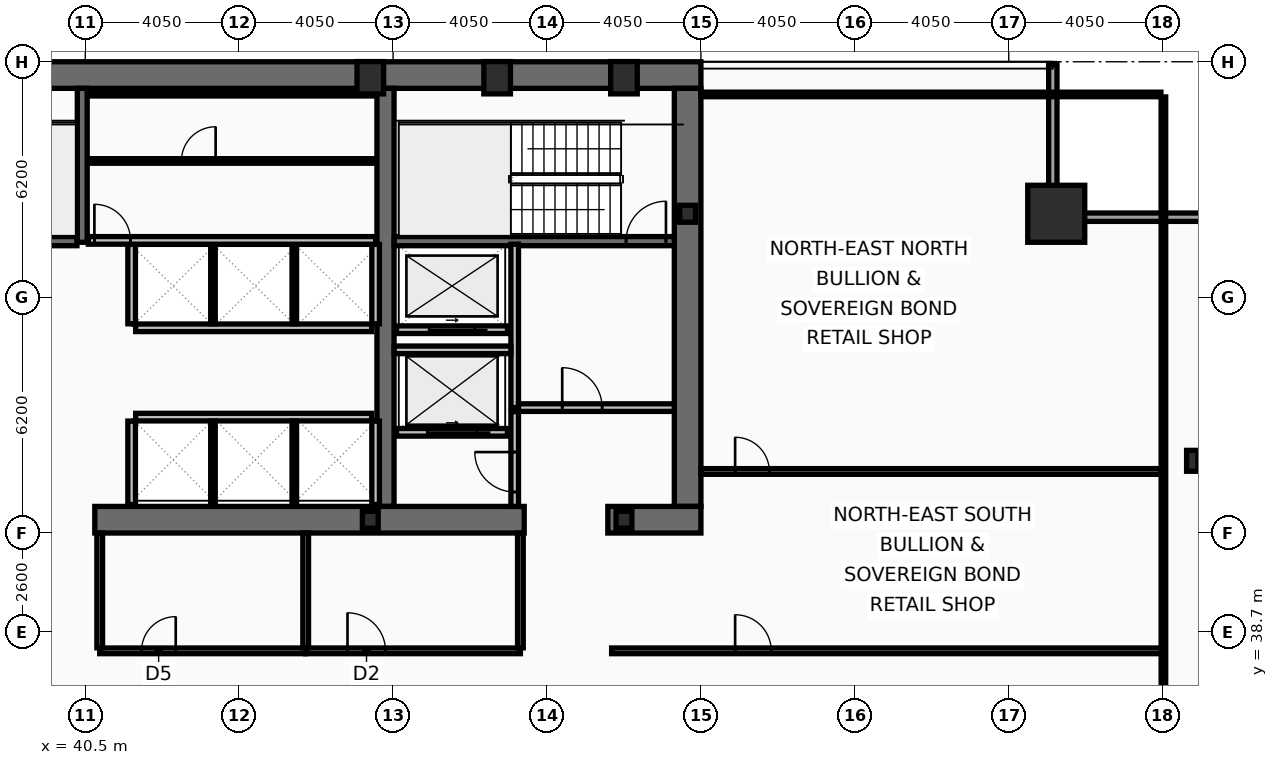
"""IFC4 building model, lengths in metres.
Left out: names, types, materials, properties, quantities, classifications, styles, units other than length and angle.
Written with IfcOpenShell. Run it as: python <this file> out.ifc"""

import sys

from ifc_helpers import new_model, si_unit, direction, frame, frame_2d, origin, origin_2d, place, context, subcontext, project, spatial, rectangle, hollow_rectangle, i_section, extrude, element, fill, save


model = new_model("IFC4")
c1 = context("Model", 3, precision=1e-05, world=origin(), true_north=direction((0.0, 1.0)))
c2 = subcontext(c1, "Body", "Model", "MODEL_VIEW")
j1 = project(units=[si_unit("LENGTHUNIT", "METRE"), si_unit("PLANEANGLEUNIT", "RADIAN")], contexts=[c1])
p1 = place(None, origin())
s1 = spatial("IfcSite", under=j1, at=p1, CompositionType="ELEMENT")
p2 = place(p1, origin())
s2 = spatial("IfcBuilding", under=s1, at=p2, CompositionType="ELEMENT")
p3 = place(p2, frame((0.0, 0.0, 129.0)))
s3 = spatial("IfcBuildingStorey", under=s2, at=p3, CompositionType="ELEMENT", Elevation=129.0)
p4 = place(p3, frame((16.2, 53.35, 0.0), z_axis=(0.0, 0.0, 1.0), x_axis=(1.0, 0.0, 0.0)))
e1 = element("IfcWall", 1, at=p4, inside=s3, PredefinedType="SHEAR", context=c2, shape_type="SweptSolid", body=[
    extrude(rectangle(XDim=40.5, YDim=0.7, at=frame_2d((20.25, 0.0))), origin(), (0.0, 0.0, 1.0), 3.44),
])
p5 = place(p3, frame((56.35, 53.0, 0.0), z_axis=(0.0, 0.0, 1.0), x_axis=(0.0, -1.0, 0.0)))
e2 = element("IfcWall", 2, at=p5, inside=s3, PredefinedType="SHEAR", context=c2, shape_type="SweptSolid", body=[
    extrude(rectangle(XDim=11.0, YDim=0.7, at=frame_2d((5.5, 0.0))), origin(), (0.0, 0.0, 1.0), 3.44),
])
p6 = place(p3, frame((48.4, 42.0, 0.0), z_axis=(0.0, 0.0, 1.0), x_axis=(0.0, 1.0, 0.0)))
e3 = element("IfcWall", 3, at=p6, inside=s3, PredefinedType="SHEAR", context=c2, shape_type="SweptSolid", body=[
    extrude(rectangle(XDim=11.0, YDim=0.45, at=frame_2d((5.5, 0.0))), origin(), (0.0, 0.0, 1.0), 3.44),
])
p7 = place(p3, frame((52.05, 41.65, 0.0), z_axis=(0.0, 0.0, 1.0), x_axis=(-1.0, 0.0, 0.0)))
e4 = element("IfcWall", 4, at=p7, inside=s3, PredefinedType="SHEAR", context=c2, shape_type="SweptSolid", body=[
    extrude(rectangle(XDim=11.3, YDim=0.7, at=frame_2d((5.65, 0.0))), origin(), (0.0, 0.0, 1.0), 3.44),
])
p8 = place(p3, frame((56.7, 41.65, 0.0), z_axis=(0.0, 0.0, 1.0), x_axis=(-1.0, 0.0, 0.0)))
e5 = element("IfcWall", 5, at=p8, inside=s3, PredefinedType="SHEAR", context=c2, shape_type="SweptSolid", body=[
    extrude(rectangle(XDim=2.45, YDim=0.7, at=frame_2d((1.225, 0.0))), origin(), (0.0, 0.0, 1.0), 3.44),
])
p9 = place(p3, frame((40.42, 48.95, 0.0), z_axis=(0.0, 0.0, 1.0), x_axis=(0.0, 1.0, 0.0)))
e6 = element("IfcWall", 6, at=p9, inside=s3, PredefinedType="SHEAR", context=c2, shape_type="SweptSolid", body=[
    extrude(rectangle(XDim=4.05, YDim=0.26, at=frame_2d((2.025, 0.0))), origin(), (0.0, 0.0, 1.0), 3.44),
])
p10 = place(p3, frame((48.63, 48.98, 0.0), z_axis=(0.0, 0.0, 1.0), x_axis=(1.0, 0.0, 0.0)))
e7 = element("IfcWall", 7, at=p10, inside=s3, PredefinedType="SHEAR", context=c2, shape_type="SweptSolid", body=[
    extrude(rectangle(XDim=7.37, YDim=0.24, at=frame_2d((3.685, 0.0))), origin(), (0.0, 0.0, 1.0), 3.44),
])
p11 = place(p10, frame((6.1, 0.0, 0.0)))
e8 = element("IfcOpeningElement", 8, at=p11, cuts=e7, PredefinedType="OPENING", context=c2, shape_type="SweptSolid", body=[
    extrude(rectangle(XDim=1.05, YDim=2.15, at=frame_2d((0.525, 1.075))), frame((0.0, 0.13, 0.0), z_axis=(0.0, -1.0, 0.0), x_axis=(1.0, 0.0, 0.0)), (0.0, 0.0, 1.0), 0.26),
])
p12 = place(p3, frame((32.72, 48.98, 0.0), z_axis=(0.0, 0.0, 1.0), x_axis=(1.0, 0.0, 0.0)))
e9 = element("IfcWall", 9, at=p12, inside=s3, PredefinedType="SHEAR", context=c2, shape_type="SweptSolid", body=[
    extrude(rectangle(XDim=7.56, YDim=0.24, at=frame_2d((3.78, 0.0))), origin(), (0.0, 0.0, 1.0), 3.44),
])
p13 = place(p12, frame((0.22, 0.0, 0.0)))
e10 = element("IfcOpeningElement", 10, at=p13, cuts=e9, PredefinedType="OPENING", context=c2, shape_type="SweptSolid", body=[
    extrude(rectangle(XDim=1.05, YDim=2.15, at=frame_2d((0.525, 1.075))), frame((0.0, 0.13, 0.0), z_axis=(0.0, -1.0, 0.0), x_axis=(1.0, 0.0, 0.0)), (0.0, 0.0, 1.0), 0.26),
])
p14 = place(p3, frame((66.05, 49.7, 0.0), z_axis=(0.0, 0.0, 1.0), x_axis=(1.0, 0.0, 0.0)))
e11 = element("IfcColumn", 11, at=p14, inside=s3, PredefinedType="COLUMN", context=c2, shape_type="SweptSolid", body=[
    extrude(hollow_rectangle(XDim=1.5, YDim=1.5, WallThickness=0.07, at=origin_2d()), origin(), (0.0, 0.0, 1.0), 3.6),
])
for number, where, z_axis, x_axis in (
    (12, (48.0, 53.28, 0.0), (0.0, 0.0, 1.0), (1.0, 0.0, 0.0)),
    (13, (51.337, 53.28, 0.0), (0.0, 0.0, 1.0), (1.0, 0.0, 0.0)),
    (14, (54.675, 53.28, 0.0), (0.0, 0.0, 1.0), (1.0, 0.0, 0.0)),
):
    element("IfcColumn", number, at=place(p3, frame(where, z_axis=z_axis, x_axis=x_axis)), inside=s3, PredefinedType="COLUMN", context=c2, shape_type="SweptSolid", body=[
        extrude(hollow_rectangle(XDim=0.7, YDim=0.85, WallThickness=0.05, at=origin_2d()), origin(), (0.0, 0.0, 1.0), 3.6),
    ])
p15 = place(p3, frame((69.63, 43.2, 0.0), z_axis=(0.0, 0.0, 1.0), x_axis=(1.0, 0.0, 0.0)))
e15 = element("IfcColumn", 15, at=p15, inside=s3, PredefinedType="COLUMN", context=c2, shape_type="SweptSolid", body=[
    extrude(i_section(OverallWidth=0.3, OverallDepth=0.55, WebThickness=0.015, FlangeThickness=0.029, at=origin_2d()), origin(), (0.0, 0.0, 1.0), 3.6),
])
for number, where, z_axis, x_axis in (
    (16, (56.35, 49.7, 0.0), (0.0, 0.0, 1.0), (1.0, 0.0, 0.0)),
    (17, (48.0, 41.65, 0.0), (0.0, 0.0, 1.0), (1.0, 0.0, 0.0)),
    (18, (54.675, 41.65, 0.0), (0.0, 0.0, 1.0), (1.0, 0.0, 0.0)),
):
    element("IfcColumn", number, at=place(p3, frame(where, z_axis=z_axis, x_axis=x_axis)), inside=s3, PredefinedType="COLUMN", context=c2, shape_type="SweptSolid", body=[
        extrude(i_section(OverallWidth=0.416, OverallDepth=0.446, WebThickness=0.039, FlangeThickness=0.063, at=origin_2d()), origin(), (0.0, 0.0, 1.0), 3.6),
    ])
p16 = place(p3, frame((65.96, 53.63, 0.0), z_axis=(0.0, 0.0, 1.0), x_axis=(0.0, -1.0, 0.0)))
e19 = element("IfcWall", 19, at=p16, inside=s3, PredefinedType="SOLIDWALL", context=c2, shape_type="SweptSolid", body=[
    extrude(rectangle(XDim=3.91, YDim=0.22, at=frame_2d((1.955, 0.0))), origin(), (0.0, 0.0, 1.0), 2.83),
])
p17 = place(p3, frame((65.85, 49.61, 0.0), z_axis=(0.0, 0.0, 1.0), x_axis=(1.0, 0.0, 0.0)))
e20 = element("IfcWall", 20, at=p17, inside=s3, PredefinedType="SOLIDWALL", context=c2, shape_type="SweptSolid", body=[
    extrude(rectangle(XDim=4.22, YDim=0.22, at=frame_2d((2.11, 0.0))), origin(), (0.0, 0.0, 1.0), 2.83),
])
p18 = place(p3, frame((51.61, 43.95, 0.0), z_axis=(0.0, 0.0, 1.0), x_axis=(-1.0, 0.0, 0.0)))
e21 = element("IfcWall", 21, at=p18, inside=s3, PredefinedType="PARTITIONING", context=c2, shape_type="SweptSolid", body=[
    extrude(rectangle(XDim=2.92, YDim=0.2, at=frame_2d((1.46, 0.0))), origin(), (0.0, 0.0, 1.0), 3.44),
])
p19 = place(p18, frame((0.81, 0.0, 0.0)))
e22 = element("IfcOpeningElement", 22, at=p19, cuts=e21, PredefinedType="OPENING", context=c2, shape_type="SweptSolid", body=[
    extrude(rectangle(XDim=1.3, YDim=2.18, at=frame_2d((0.65, 1.09))), frame((0.0, 0.11, 0.0), z_axis=(0.0, -1.0, 0.0), x_axis=(1.0, 0.0, 0.0)), (0.0, 0.0, 1.0), 0.22),
])
p20 = place(p3, frame((51.61, 46.65, 0.0), z_axis=(0.0, 0.0, 1.0), x_axis=(-1.0, 0.0, 0.0)))
e23 = element("IfcWall", 23, at=p20, inside=s3, PredefinedType="PARTITIONING", context=c2, shape_type="SweptSolid", body=[
    extrude(rectangle(XDim=2.92, YDim=0.2, at=frame_2d((1.46, 0.0))), origin(), (0.0, 0.0, 1.0), 3.44),
])
p21 = place(p20, frame((0.86, 0.0, 0.0)))
e24 = element("IfcOpeningElement", 24, at=p21, cuts=e23, PredefinedType="OPENING", context=c2, shape_type="SweptSolid", body=[
    extrude(rectangle(XDim=1.2, YDim=2.18, at=frame_2d((0.6, 1.09))), frame((0.0, 0.11, 0.0), z_axis=(0.0, -1.0, 0.0), x_axis=(1.0, 0.0, 0.0)), (0.0, 0.0, 1.0), 0.22),
])
p22 = place(p3, frame((51.8, 44.6, 0.0), z_axis=(0.0, 0.0, 1.0), x_axis=(0.0, 1.0, 0.0)))
e25 = element("IfcWall", 25, at=p22, inside=s3, PredefinedType="PARTITIONING", context=c2, shape_type="SweptSolid", body=[
    extrude(rectangle(XDim=4.3, YDim=0.2, at=frame_2d((2.15, 0.0))), origin(), (0.0, 0.0, 1.0), 3.44),
])
p23 = place(p3, frame((51.9, 44.6, 0.0), z_axis=(0.0, 0.0, 1.0), x_axis=(1.0, 0.0, 0.0)))
e26 = element("IfcWall", 26, at=p23, inside=s3, PredefinedType="PARTITIONING", context=c2, shape_type="SweptSolid", body=[
    extrude(rectangle(XDim=4.1, YDim=0.2, at=frame_2d((2.05, 0.0))), origin(), (0.0, 0.0, 1.0), 3.44),
])
p24 = place(p23, frame((1.15, 0.0, 0.0)))
e27 = element("IfcOpeningElement", 27, at=p24, cuts=e26, PredefinedType="OPENING", context=c2, shape_type="SweptSolid", body=[
    extrude(rectangle(XDim=1.05, YDim=2.15, at=frame_2d((0.525, 1.075))), frame((0.0, 0.11, 0.0), z_axis=(0.0, -1.0, 0.0), x_axis=(1.0, 0.0, 0.0)), (0.0, 0.0, 1.0), 0.22),
])
p25 = place(p3, frame((48.63, 46.12, 0.0), z_axis=(0.0, 0.0, 1.0), x_axis=(1.0, 0.0, 0.0)))
e28 = element("IfcWall", 28, at=p25, inside=s3, PredefinedType="PARTITIONING", context=c2, shape_type="SweptSolid", body=[
    extrude(rectangle(XDim=3.07, YDim=0.2, at=frame_2d((1.535, 0.0))), origin(), (0.0, 0.0, 1.0), 3.44),
])
p26 = place(p3, frame((51.8, 42.0, 0.0), z_axis=(0.0, 0.0, 1.0), x_axis=(0.0, 1.0, 0.0)))
e29 = element("IfcWall", 29, at=p26, inside=s3, PredefinedType="PARTITIONING", context=c2, shape_type="SweptSolid", body=[
    extrude(rectangle(XDim=2.495, YDim=0.2, at=frame_2d((1.248, 0.0))), origin(), (0.0, 0.0, 1.0), 3.44),
])
p27 = place(p26, frame((0.38, 0.0, 0.0)))
e30 = element("IfcOpeningElement", 30, at=p27, cuts=e29, PredefinedType="OPENING", context=c2, shape_type="SweptSolid", body=[
    extrude(rectangle(XDim=1.05, YDim=2.15, at=frame_2d((0.525, 1.075))), frame((0.0, 0.11, 0.0), z_axis=(0.0, -1.0, 0.0), x_axis=(1.0, 0.0, 0.0)), (0.0, 0.0, 1.0), 0.22),
])
p28 = place(p3, frame((41.825, 46.7, 0.0), z_axis=(0.0, 0.0, 1.0), x_axis=(1.0, 0.0, 0.0)))
e31 = element("IfcWall", 31, at=p28, inside=s3, PredefinedType="PARTITIONING", context=c2, shape_type="SweptSolid", body=[
    extrude(rectangle(XDim=6.21, YDim=0.2, at=frame_2d((3.105, 0.0))), origin(), (0.0, 0.0, 1.0), 3.44),
])
for number, where, z_axis, x_axis in (
    (32, (41.72, 46.805, 0.0), (0.0, 0.0, 1.0), (0.0, 1.0, 0.0)),
    (33, (48.14, 46.805, 0.0), (0.0, 0.0, 1.0), (0.0, 1.0, 0.0)),
):
    element("IfcWall", number, at=place(p3, frame(where, z_axis=z_axis, x_axis=x_axis)), inside=s3, PredefinedType="PARTITIONING", context=c2, shape_type="SweptSolid", body=[
        extrude(rectangle(XDim=2.09, YDim=0.2, at=frame_2d((1.045, 0.0))), origin(), (0.0, 0.0, 1.0), 3.44),
    ])
for number, where, z_axis, x_axis in (
    (34, (43.86, 46.805, 0.0), (0.0, 0.0, 1.0), (0.0, 1.0, 0.0)),
    (35, (46.0, 46.805, 0.0), (0.0, 0.0, 1.0), (0.0, 1.0, 0.0)),
):
    element("IfcWall", number, at=place(p3, frame(where, z_axis=z_axis, x_axis=x_axis)), inside=s3, PredefinedType="PARTITIONING", context=c2, shape_type="SweptSolid", body=[
        extrude(rectangle(XDim=2.09, YDim=0.12, at=frame_2d((1.045, 0.0))), origin(), (0.0, 0.0, 1.0), 3.44),
    ])
p29 = place(p3, frame((41.825, 44.35, 0.0), z_axis=(0.0, 0.0, 1.0), x_axis=(1.0, 0.0, 0.0)))
e36 = element("IfcWall", 36, at=p29, inside=s3, PredefinedType="PARTITIONING", context=c2, shape_type="SweptSolid", body=[
    extrude(rectangle(XDim=6.21, YDim=0.2, at=frame_2d((3.105, 0.0))), origin(), (0.0, 0.0, 1.0), 3.44),
])
for number, where, z_axis, x_axis in (
    (37, (41.72, 42.05, 0.0), (0.0, 0.0, 1.0), (0.0, 1.0, 0.0)),
    (38, (48.14, 42.05, 0.0), (0.0, 0.0, 1.0), (0.0, 1.0, 0.0)),
):
    element("IfcWall", number, at=place(p3, frame(where, z_axis=z_axis, x_axis=x_axis)), inside=s3, PredefinedType="PARTITIONING", context=c2, shape_type="SweptSolid", body=[
        extrude(rectangle(XDim=2.195, YDim=0.2, at=frame_2d((1.098, 0.0))), origin(), (0.0, 0.0, 1.0), 3.44),
    ])
for number, where, z_axis, x_axis in (
    (39, (43.86, 42.05, 0.0), (0.0, 0.0, 1.0), (0.0, 1.0, 0.0)),
    (40, (46.0, 42.05, 0.0), (0.0, 0.0, 1.0), (0.0, 1.0, 0.0)),
):
    element("IfcWall", number, at=place(p3, frame(where, z_axis=z_axis, x_axis=x_axis)), inside=s3, PredefinedType="PARTITIONING", context=c2, shape_type="SweptSolid", body=[
        extrude(rectangle(XDim=2.195, YDim=0.12, at=frame_2d((1.098, 0.0))), origin(), (0.0, 0.0, 1.0), 3.44),
    ])
p30 = place(p3, frame((40.58, 52.86, 0.0), z_axis=(0.0, 0.0, 1.0), x_axis=(1.0, 0.0, 0.0)))
e41 = element("IfcWall", 41, at=p30, inside=s3, PredefinedType="PARTITIONING", context=c2, shape_type="SweptSolid", body=[
    extrude(rectangle(XDim=7.56, YDim=0.12, at=frame_2d((3.78, 0.0))), origin(), (0.0, 0.0, 1.0), 3.44),
])
p31 = place(p3, frame((40.58, 49.0, 0.0), z_axis=(0.0, 0.0, 1.0), x_axis=(1.0, 0.0, 0.0)))
e42 = element("IfcWall", 42, at=p31, inside=s3, PredefinedType="PARTITIONING", context=c2, shape_type="SweptSolid", body=[
    extrude(rectangle(XDim=7.56, YDim=0.2, at=frame_2d((3.78, 0.0))), origin(), (0.0, 0.0, 1.0), 3.44),
])
p32 = place(p31, frame((0.16, 0.0, 0.0)))
e43 = element("IfcOpeningElement", 43, at=p32, cuts=e42, PredefinedType="OPENING", context=c2, shape_type="SweptSolid", body=[
    extrude(rectangle(XDim=0.95, YDim=2.1, at=frame_2d((0.475, 1.05))), frame((0.0, 0.11, 0.0), z_axis=(0.0, -1.0, 0.0), x_axis=(1.0, 0.0, 0.0)), (0.0, 0.0, 1.0), 0.22),
])
p33 = place(p3, frame((40.63, 51.09, 0.0), z_axis=(0.0, 0.0, 1.0), x_axis=(1.0, 0.0, 0.0)))
e44 = element("IfcWall", 44, at=p33, inside=s3, PredefinedType="PARTITIONING", context=c2, shape_type="SweptSolid", body=[
    extrude(rectangle(XDim=7.46, YDim=0.12, at=frame_2d((3.73, 0.0))), origin(), (0.0, 0.0, 1.0), 3.44),
])
p34 = place(p33, frame((2.4, 0.0, 0.0)))
e45 = element("IfcOpeningElement", 45, at=p34, cuts=e44, PredefinedType="OPENING", context=c2, shape_type="SweptSolid", body=[
    extrude(rectangle(XDim=0.9, YDim=2.05, at=frame_2d((0.45, 1.025))), frame((0.0, 0.07, 0.0), z_axis=(0.0, -1.0, 0.0), x_axis=(1.0, 0.0, 0.0)), (0.0, 0.0, 1.0), 0.14),
])
p35 = place(p3, frame((40.88, 38.2, 0.0), z_axis=(0.0, 0.0, 1.0), x_axis=(1.0, 0.0, 0.0)))
e46 = element("IfcWall", 46, at=p35, inside=s3, PredefinedType="PARTITIONING", context=c2, shape_type="SweptSolid", body=[
    extrude(rectangle(XDim=5.42, YDim=0.15, at=frame_2d((2.71, 0.0))), origin(), (0.0, 0.0, 1.0), 2.73),
])
p36 = place(p35, frame((1.1, 0.0, 0.0)))
e47 = element("IfcOpeningElement", 47, at=p36, cuts=e46, PredefinedType="OPENING", context=c2, shape_type="SweptSolid", body=[
    extrude(rectangle(XDim=0.9, YDim=2.05, at=frame_2d((0.45, 1.025))), frame((0.0, 0.085, 0.0), z_axis=(0.0, -1.0, 0.0), x_axis=(1.0, 0.0, 0.0)), (0.0, 0.0, 1.0), 0.17),
])
p37 = place(p3, frame((46.3, 38.2, 0.0), z_axis=(0.0, 0.0, 1.0), x_axis=(1.0, 0.0, 0.0)))
e48 = element("IfcWall", 48, at=p37, inside=s3, PredefinedType="PARTITIONING", context=c2, shape_type="SweptSolid", body=[
    extrude(rectangle(XDim=5.65, YDim=0.15, at=frame_2d((2.825, 0.0))), origin(), (0.0, 0.0, 1.0), 2.73),
])
p38 = place(p37, frame((1.1, 0.0, 0.0)))
e49 = element("IfcOpeningElement", 49, at=p38, cuts=e48, PredefinedType="OPENING", context=c2, shape_type="SweptSolid", body=[
    extrude(rectangle(XDim=1.0, YDim=2.05, at=frame_2d((0.5, 1.025))), frame((0.0, 0.085, 0.0), z_axis=(0.0, -1.0, 0.0), x_axis=(1.0, 0.0, 0.0)), (0.0, 0.0, 1.0), 0.17),
])
for number, where, z_axis, x_axis in (
    (50, (40.88, 38.28, 0.0), (0.0, 0.0, 1.0), (0.0, 1.0, 0.0)),
    (51, (46.3, 38.28, 0.0), (0.0, 0.0, 1.0), (0.0, 1.0, 0.0)),
    (52, (51.95, 38.28, 0.0), (0.0, 0.0, 1.0), (0.0, 1.0, 0.0)),
):
    element("IfcWall", number, at=place(p3, frame(where, z_axis=z_axis, x_axis=x_axis)), inside=s3, PredefinedType="PARTITIONING", context=c2, shape_type="SweptSolid", body=[
        extrude(rectangle(XDim=3.02, YDim=0.15, at=frame_2d((1.51, 0.0))), origin(), (0.0, 0.0, 1.0), 3.44),
    ])
p39 = place(p3, frame((54.35, 38.2, 0.0), z_axis=(0.0, 0.0, 1.0), x_axis=(1.0, 0.0, 0.0)))
e53 = element("IfcWall", 53, at=p39, inside=s3, PredefinedType="PARTITIONING", context=c2, shape_type="SweptSolid", body=[
    extrude(rectangle(XDim=14.52, YDim=0.15, at=frame_2d((7.26, 0.0))), origin(), (0.0, 0.0, 1.0), 2.73),
])
p40 = place(p39, frame((3.25, 0.0, 0.0)))
e54 = element("IfcOpeningElement", 54, at=p40, cuts=e53, PredefinedType="OPENING", context=c2, shape_type="SweptSolid", body=[
    extrude(rectangle(XDim=0.95, YDim=2.05, at=frame_2d((0.475, 1.025))), frame((0.0, 0.085, 0.0), z_axis=(0.0, -1.0, 0.0), x_axis=(1.0, 0.0, 0.0)), (0.0, 0.0, 1.0), 0.17),
])
p41 = place(p3, frame((56.7, 42.92, 0.0), z_axis=(0.0, 0.0, 1.0), x_axis=(1.0, 0.0, 0.0)))
e55 = element("IfcWall", 55, at=p41, inside=s3, PredefinedType="PARTITIONING", context=c2, shape_type="SweptSolid", body=[
    extrude(rectangle(XDim=12.105, YDim=0.15, at=frame_2d((6.052, 0.0))), origin(), (0.0, 0.0, 1.0), 2.73),
])
p42 = place(p41, frame((0.9, 0.0, 0.0)))
e56 = element("IfcOpeningElement", 56, at=p42, cuts=e55, PredefinedType="OPENING", context=c2, shape_type="SweptSolid", body=[
    extrude(rectangle(XDim=0.9, YDim=2.05, at=frame_2d((0.45, 1.025))), frame((0.0, 0.085, 0.0), z_axis=(0.0, -1.0, 0.0), x_axis=(1.0, 0.0, 0.0)), (0.0, 0.0, 1.0), 0.17),
])
p43 = place(p3, frame((68.87, 10.665, 0.0), z_axis=(0.0, 0.0, 1.0), x_axis=(0.0, 1.0, 0.0)))
e57 = element("IfcWall", 57, at=p43, inside=s3, PredefinedType="PARTITIONING", context=c2, shape_type="SweptSolid", body=[
    extrude(rectangle(XDim=42.11, YDim=0.12, at=frame_2d((21.055, 0.0))), origin(), (0.0, 0.0, 1.0), 2.73),
])
p44 = place(p3, frame((56.7, 52.84, 0.0), z_axis=(0.0, 0.0, 1.0), x_axis=(1.0, 0.0, 0.0)))
e58 = element("IfcWall", 58, at=p44, inside=s3, PredefinedType="PARTITIONING", context=c2, shape_type="SweptSolid", body=[
    extrude(rectangle(XDim=12.105, YDim=0.12, at=frame_2d((6.052, 0.0))), origin(), (0.0, 0.0, 1.0), 3.44),
])
p45 = place(p11, origin())
e59 = element("IfcDoor", 59, at=p45, inside=s3, OperationType="SINGLE_SWING_RIGHT", PredefinedType="DOOR", context=c2, shape_type="SweptSolid", body=[
    extrude(rectangle(XDim=1.05, YDim=2.15, at=frame_2d((0.525, 1.075))), frame((0.0, 0.025, 0.0), z_axis=(0.0, -1.0, 0.0), x_axis=(1.0, 0.0, 0.0)), (0.0, 0.0, 1.0), 0.05),
])
fill(e8, e59)
p46 = place(p19, origin())
e60 = element("IfcDoor", 60, at=p46, inside=s3, OperationType="SLIDING_TO_LEFT", PredefinedType="DOOR", context=c2, shape_type="SweptSolid", body=[
    extrude(rectangle(XDim=1.3, YDim=2.18, at=frame_2d((0.65, 1.09))), frame((0.0, 0.025, 0.0), z_axis=(0.0, -1.0, 0.0), x_axis=(1.0, 0.0, 0.0)), (0.0, 0.0, 1.0), 0.05),
])
fill(e22, e60)
p47 = place(p21, origin())
e61 = element("IfcDoor", 61, at=p47, inside=s3, OperationType="SLIDING_TO_LEFT", PredefinedType="DOOR", context=c2, shape_type="SweptSolid", body=[
    extrude(rectangle(XDim=1.2, YDim=2.18, at=frame_2d((0.6, 1.09))), frame((0.0, 0.025, 0.0), z_axis=(0.0, -1.0, 0.0), x_axis=(1.0, 0.0, 0.0)), (0.0, 0.0, 1.0), 0.05),
])
fill(e24, e61)
p48 = place(p24, origin())
e62 = element("IfcDoor", 62, at=p48, inside=s3, OperationType="SINGLE_SWING_LEFT", PredefinedType="DOOR", context=c2, shape_type="SweptSolid", body=[
    extrude(rectangle(XDim=1.05, YDim=2.15, at=frame_2d((0.525, 1.075))), frame((0.0, 0.025, 0.0), z_axis=(0.0, -1.0, 0.0), x_axis=(1.0, 0.0, 0.0)), (0.0, 0.0, 1.0), 0.05),
])
fill(e27, e62)
p49 = place(p27, origin())
e63 = element("IfcDoor", 63, at=p49, inside=s3, OperationType="SINGLE_SWING_RIGHT", PredefinedType="DOOR", context=c2, shape_type="SweptSolid", body=[
    extrude(rectangle(XDim=1.05, YDim=2.15, at=frame_2d((0.525, 1.075))), frame((0.0, 0.025, 0.0), z_axis=(0.0, -1.0, 0.0), x_axis=(1.0, 0.0, 0.0)), (0.0, 0.0, 1.0), 0.05),
])
fill(e30, e63)
p50 = place(p32, origin())
e64 = element("IfcDoor", 64, at=p50, inside=s3, OperationType="SINGLE_SWING_LEFT", PredefinedType="DOOR", context=c2, shape_type="SweptSolid", body=[
    extrude(rectangle(XDim=0.95, YDim=2.1, at=frame_2d((0.475, 1.05))), frame((0.0, 0.025, 0.0), z_axis=(0.0, -1.0, 0.0), x_axis=(1.0, 0.0, 0.0)), (0.0, 0.0, 1.0), 0.05),
])
fill(e43, e64)
p51 = place(p34, origin())
e65 = element("IfcDoor", 65, at=p51, inside=s3, OperationType="SINGLE_SWING_RIGHT", PredefinedType="DOOR", context=c2, shape_type="SweptSolid", body=[
    extrude(rectangle(XDim=0.9, YDim=2.05, at=frame_2d((0.45, 1.025))), frame((0.0, 0.025, 0.0), z_axis=(0.0, -1.0, 0.0), x_axis=(1.0, 0.0, 0.0)), (0.0, 0.0, 1.0), 0.05),
])
fill(e45, e65)
p52 = place(p36, origin())
e66 = element("IfcDoor", 66, at=p52, inside=s3, OperationType="SINGLE_SWING_RIGHT", PredefinedType="DOOR", context=c2, shape_type="SweptSolid", body=[
    extrude(rectangle(XDim=0.9, YDim=2.05, at=frame_2d((0.45, 1.025))), frame((0.0, 0.025, 0.0), z_axis=(0.0, -1.0, 0.0), x_axis=(1.0, 0.0, 0.0)), (0.0, 0.0, 1.0), 0.05),
])
fill(e47, e66)
p53 = place(p38, origin())
e67 = element("IfcDoor", 67, at=p53, inside=s3, OperationType="SINGLE_SWING_LEFT", PredefinedType="DOOR", context=c2, shape_type="SweptSolid", body=[
    extrude(rectangle(XDim=1.0, YDim=2.05, at=frame_2d((0.5, 1.025))), frame((0.0, 0.025, 0.0), z_axis=(0.0, -1.0, 0.0), x_axis=(1.0, 0.0, 0.0)), (0.0, 0.0, 1.0), 0.05),
])
fill(e49, e67)
p54 = place(p40, origin())
e68 = element("IfcDoor", 68, at=p54, inside=s3, OperationType="SINGLE_SWING_LEFT", PredefinedType="DOOR", context=c2, shape_type="SweptSolid", body=[
    extrude(rectangle(XDim=0.95, YDim=2.05, at=frame_2d((0.475, 1.025))), frame((0.0, 0.025, 0.0), z_axis=(0.0, -1.0, 0.0), x_axis=(1.0, 0.0, 0.0)), (0.0, 0.0, 1.0), 0.05),
])
fill(e54, e68)
p55 = place(p42, origin())
e69 = element("IfcDoor", 69, at=p55, inside=s3, OperationType="SINGLE_SWING_LEFT", PredefinedType="DOOR", context=c2, shape_type="SweptSolid", body=[
    extrude(rectangle(XDim=0.9, YDim=2.05, at=frame_2d((0.45, 1.025))), frame((0.0, 0.025, 0.0), z_axis=(0.0, -1.0, 0.0), x_axis=(1.0, 0.0, 0.0)), (0.0, 0.0, 1.0), 0.05),
])
fill(e56, e69)
save(model, sys.argv[1])
